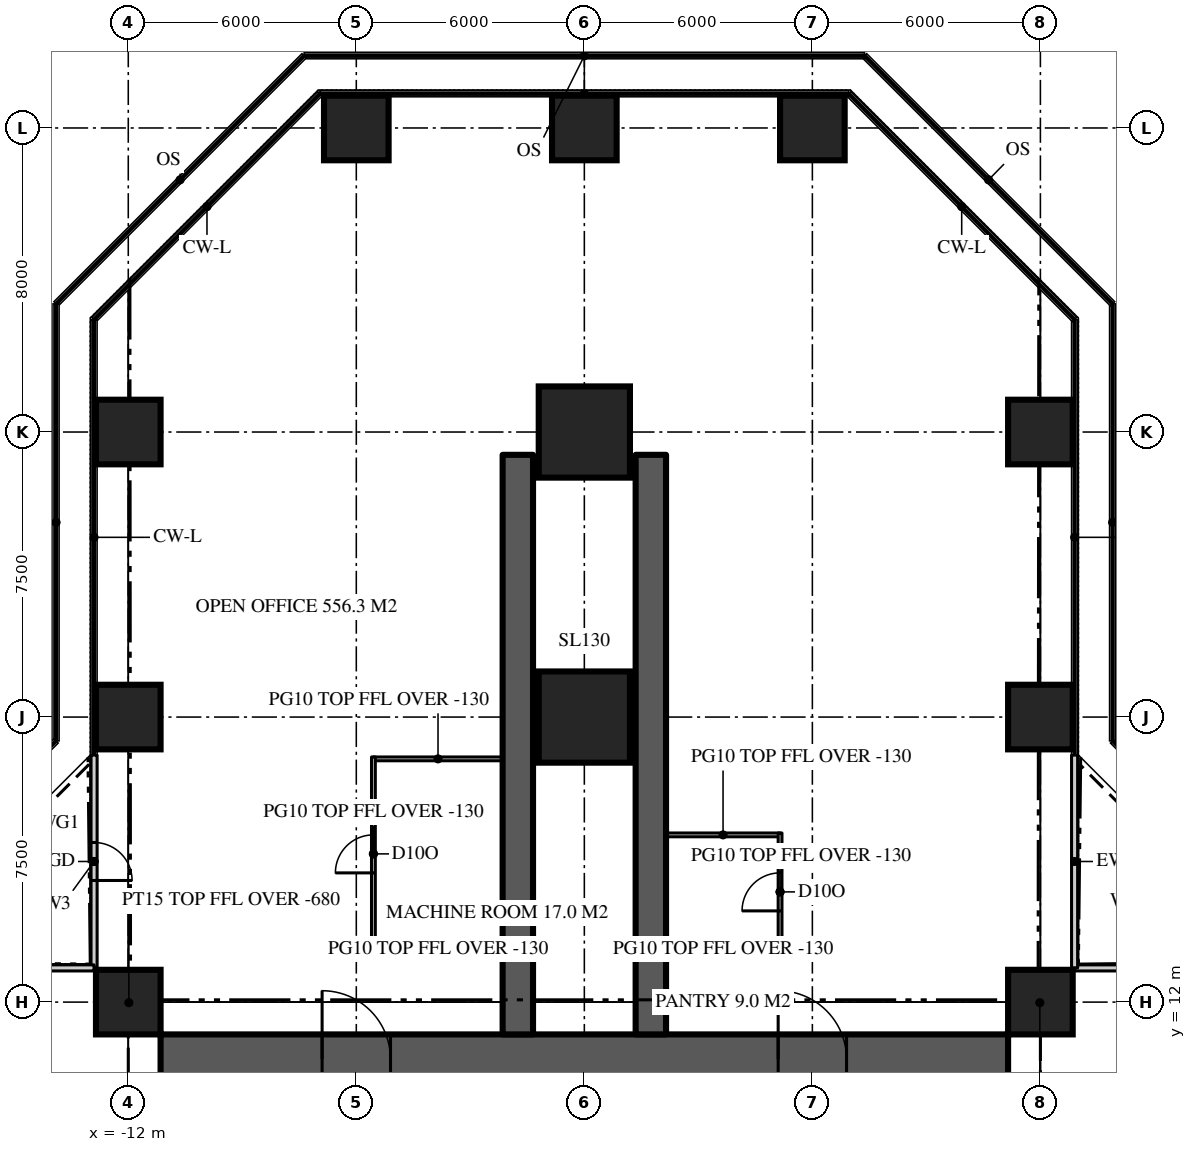
"""IFC4 building model, lengths in metres.
Left out: names, types, materials, properties, quantities, classifications, styles, units other than length and angle.
Written with IfcOpenShell. Run it as: python <this file> out.ifc"""

import sys

from ifc_helpers import new_model, si_unit, direction, frame, frame_2d, origin, origin_2d, place, context, subcontext, project, spatial, rectangle, extrude, element, fill, save


model = new_model("IFC4")
c1 = context("Model", 3, precision=1e-05, world=origin(), true_north=direction((0.0, 1.0)))
c2 = subcontext(c1, "Body", "Model", "MODEL_VIEW")
j1 = project(units=[si_unit("LENGTHUNIT", "METRE"), si_unit("PLANEANGLEUNIT", "RADIAN")], contexts=[c1])
p1 = place(None, origin())
s1 = spatial("IfcSite", under=j1, at=p1, CompositionType="ELEMENT")
p2 = place(p1, origin())
s2 = spatial("IfcBuilding", under=s1, at=p2, CompositionType="ELEMENT")
p3 = place(p2, frame((0.0, 0.0, 63.0)))
s3 = spatial("IfcBuildingStorey", under=s2, at=p3, CompositionType="ELEMENT", Elevation=63.0)
p4 = place(p3, frame((-11.15, 10.5, 0.0), z_axis=(0.0, 0.0, 1.0), x_axis=(1.0, 0.0, 0.0)))
e1 = element("IfcWall", 1, at=p4, inside=s3, PredefinedType="SHEAR", context=c2, shape_type="SweptSolid", body=[
    extrude(rectangle(XDim=22.3, YDim=1.3, at=frame_2d((11.15, 0.0))), origin(), (0.0, 0.0, 1.0), 3.9),
])
p5 = place(p4, frame((4.25, 0.0, 0.0)))
e2 = element("IfcOpeningElement", 2, at=p5, cuts=e1, PredefinedType="OPENING", context=c2, shape_type="SweptSolid", body=[
    extrude(rectangle(XDim=1.8, YDim=2.2, at=frame_2d((0.9, 1.1))), frame((0.0, 0.66, 0.0), z_axis=(0.0, -1.0, 0.0), x_axis=(1.0, 0.0, 0.0)), (0.0, 0.0, 1.0), 1.32),
])
p6 = place(p4, frame((16.25, 0.0, 0.0)))
e3 = element("IfcOpeningElement", 3, at=p6, cuts=e1, PredefinedType="OPENING", context=c2, shape_type="SweptSolid", body=[
    extrude(rectangle(XDim=1.8, YDim=2.2, at=frame_2d((0.9, 1.1))), frame((0.0, 0.66, 0.0), z_axis=(0.0, -1.0, 0.0), x_axis=(1.0, 0.0, 0.0)), (0.0, 0.0, 1.0), 1.32),
])
for number, where, z_axis, x_axis in (
    (4, (1.75, 11.15, 0.0), (0.0, 0.0, 1.0), (0.0, 1.0, 0.0)),
    (5, (-1.75, 11.15, 0.0), (0.0, 0.0, 1.0), (0.0, 1.0, 0.0)),
):
    element("IfcWall", number, at=place(p3, frame(where, z_axis=z_axis, x_axis=x_axis)), inside=s3, PredefinedType="SHEAR", context=c2, shape_type="SweptSolid", body=[
        extrude(rectangle(XDim=15.25, YDim=0.8, at=frame_2d((7.625, 0.0))), origin(), (0.0, 0.0, 1.0), 3.9),
    ])
for number, where, z_axis, x_axis in (
    (6, (-12.0, 12.0, 0.0), (0.0, 0.0, 1.0), (1.0, 0.0, 0.0)),
    (7, (12.0, 12.0, 0.0), (0.0, 0.0, 1.0), (1.0, 0.0, 0.0)),
    (8, (-12.0, 19.5, 0.0), (0.0, 0.0, 1.0), (1.0, 0.0, 0.0)),
):
    element("IfcColumn", number, at=place(p3, frame(where, z_axis=z_axis, x_axis=x_axis)), inside=s3, PredefinedType="COLUMN", context=c2, shape_type="SweptSolid", body=[
        extrude(rectangle(XDim=1.7, YDim=1.7, at=origin_2d()), origin(), (0.0, 0.0, 1.0), 3.9),
    ])
p7 = place(p3, frame((0.0, 19.5, 0.0), z_axis=(0.0, 0.0, 1.0), x_axis=(1.0, 0.0, 0.0)))
e9 = element("IfcColumn", 9, at=p7, inside=s3, PredefinedType="COLUMN", context=c2, shape_type="SweptSolid", body=[
    extrude(rectangle(XDim=2.4, YDim=2.4, at=origin_2d()), origin(), (0.0, 0.0, 1.0), 3.9),
])
for number, where, z_axis, x_axis in (
    (10, (12.0, 19.5, 0.0), (0.0, 0.0, 1.0), (1.0, 0.0, 0.0)),
    (11, (-12.0, 27.0, 0.0), (0.0, 0.0, 1.0), (1.0, 0.0, 0.0)),
):
    element("IfcColumn", number, at=place(p3, frame(where, z_axis=z_axis, x_axis=x_axis)), inside=s3, PredefinedType="COLUMN", context=c2, shape_type="SweptSolid", body=[
        extrude(rectangle(XDim=1.7, YDim=1.7, at=origin_2d()), origin(), (0.0, 0.0, 1.0), 3.9),
    ])
p8 = place(p3, frame((0.0, 27.0, 0.0), z_axis=(0.0, 0.0, 1.0), x_axis=(1.0, 0.0, 0.0)))
e12 = element("IfcColumn", 12, at=p8, inside=s3, PredefinedType="COLUMN", context=c2, shape_type="SweptSolid", body=[
    extrude(rectangle(XDim=2.4, YDim=2.4, at=origin_2d()), origin(), (0.0, 0.0, 1.0), 3.9),
])
for number, where, z_axis, x_axis in (
    (13, (12.0, 27.0, 0.0), (0.0, 0.0, 1.0), (1.0, 0.0, 0.0)),
    (14, (-6.0, 35.0, 0.0), (0.0, 0.0, 1.0), (1.0, 0.0, 0.0)),
    (15, (0.0, 35.0, 0.0), (0.0, 0.0, 1.0), (1.0, 0.0, 0.0)),
    (16, (6.0, 35.0, 0.0), (0.0, 0.0, 1.0), (1.0, 0.0, 0.0)),
):
    element("IfcColumn", number, at=place(p3, frame(where, z_axis=z_axis, x_axis=x_axis)), inside=s3, PredefinedType="COLUMN", context=c2, shape_type="SweptSolid", body=[
        extrude(rectangle(XDim=1.7, YDim=1.7, at=origin_2d()), origin(), (0.0, 0.0, 1.0), 3.9),
    ])
p9 = place(p3, frame((18.5, 12.9, 0.0), z_axis=(0.0, 0.0, 1.0), x_axis=(-1.0, 0.0, 0.0)))
e17 = element("IfcWall", 17, at=p9, inside=s3, PredefinedType="SOLIDWALL", context=c2, shape_type="SweptSolid", body=[
    extrude(rectangle(XDim=5.6, YDim=0.16, at=frame_2d((2.8, 0.0))), origin(), (0.0, 0.0, 1.0), 3.77),
])
p10 = place(p9, frame((2.3, 0.0, 0.0)))
e18 = element("IfcOpeningElement", 18, at=p10, cuts=e17, PredefinedType="OPENING", context=c2, shape_type="SweptSolid", body=[
    extrude(rectangle(XDim=1.0, YDim=2.2, at=frame_2d((0.5, 1.1))), frame((0.0, 0.09, 0.0), z_axis=(0.0, -1.0, 0.0), x_axis=(1.0, 0.0, 0.0)), (0.0, 0.0, 1.0), 0.18),
])
p11 = place(p3, frame((12.9, 12.9, 0.0), z_axis=(0.0, 0.0, 1.0), x_axis=(0.0, 1.0, 0.0)))
e19 = element("IfcWall", 19, at=p11, inside=s3, PredefinedType="SOLIDWALL", context=c2, shape_type="SweptSolid", body=[
    extrude(rectangle(XDim=5.6, YDim=0.16, at=frame_2d((2.8, 0.0))), origin(), (0.0, 0.0, 1.0), 3.77),
])
p12 = place(p3, frame((-12.9, 18.5, 0.0), z_axis=(0.0, 0.0, 1.0), x_axis=(0.0, -1.0, 0.0)))
e20 = element("IfcWall", 20, at=p12, inside=s3, PredefinedType="SOLIDWALL", context=c2, shape_type="SweptSolid", body=[
    extrude(rectangle(XDim=5.6, YDim=0.16, at=frame_2d((2.8, 0.0))), origin(), (0.0, 0.0, 1.0), 3.77),
])
p13 = place(p12, frame((2.3, 0.0, 0.0)))
e21 = element("IfcOpeningElement", 21, at=p13, cuts=e20, PredefinedType="OPENING", context=c2, shape_type="SweptSolid", body=[
    extrude(rectangle(XDim=1.0, YDim=2.2, at=frame_2d((0.5, 1.1))), frame((0.0, 0.09, 0.0), z_axis=(0.0, -1.0, 0.0), x_axis=(1.0, 0.0, 0.0)), (0.0, 0.0, 1.0), 0.18),
])
p14 = place(p3, frame((-12.9, 12.9, 0.0), z_axis=(0.0, 0.0, 1.0), x_axis=(-1.0, 0.0, 0.0)))
e22 = element("IfcWall", 22, at=p14, inside=s3, PredefinedType="SOLIDWALL", context=c2, shape_type="SweptSolid", body=[
    extrude(rectangle(XDim=5.6, YDim=0.16, at=frame_2d((2.8, 0.0))), origin(), (0.0, 0.0, 1.0), 3.77),
])
for number, where, z_axis, x_axis in (
    (23, (-2.15, 13.4, 0.0), (0.0, 0.0, 1.0), (-1.0, 0.0, 0.0)),
    (24, (-2.15, 18.4, 0.0), (0.0, 0.0, 1.0), (-1.0, 0.0, 0.0)),
):
    element("IfcWall", number, at=place(p3, frame(where, z_axis=z_axis, x_axis=x_axis)), inside=s3, PredefinedType="PARTITIONING", context=c2, shape_type="SweptSolid", body=[
        extrude(rectangle(XDim=3.4, YDim=0.1, at=frame_2d((1.7, 0.0))), origin(), (0.0, 0.0, 1.0), 3.77),
    ])
p15 = place(p3, frame((-5.55, 13.35, 0.0), z_axis=(0.0, 0.0, 1.0), x_axis=(0.0, 1.0, 0.0)))
e25 = element("IfcWall", 25, at=p15, inside=s3, PredefinedType="PARTITIONING", context=c2, shape_type="SweptSolid", body=[
    extrude(rectangle(XDim=5.1, YDim=0.1, at=frame_2d((2.55, 0.0))), origin(), (0.0, 0.0, 1.0), 3.77),
])
p16 = place(p15, frame((2.05, 0.0, 0.0)))
e26 = element("IfcOpeningElement", 26, at=p16, cuts=e25, PredefinedType="OPENING", context=c2, shape_type="SweptSolid", body=[
    extrude(rectangle(XDim=1.0, YDim=2.2, at=frame_2d((0.5, 1.1))), frame((0.0, 0.06, 0.0), z_axis=(0.0, -1.0, 0.0), x_axis=(1.0, 0.0, 0.0)), (0.0, 0.0, 1.0), 0.12),
])
for number, where, z_axis, x_axis in (
    (27, (2.15, 13.4, 0.0), (0.0, 0.0, 1.0), (1.0, 0.0, 0.0)),
    (28, (2.15, 16.4, 0.0), (0.0, 0.0, 1.0), (1.0, 0.0, 0.0)),
):
    element("IfcWall", number, at=place(p3, frame(where, z_axis=z_axis, x_axis=x_axis)), inside=s3, PredefinedType="PARTITIONING", context=c2, shape_type="SweptSolid", body=[
        extrude(rectangle(XDim=3.0, YDim=0.1, at=frame_2d((1.5, 0.0))), origin(), (0.0, 0.0, 1.0), 3.77),
    ])
p17 = place(p3, frame((5.15, 13.35, 0.0), z_axis=(0.0, 0.0, 1.0), x_axis=(0.0, 1.0, 0.0)))
e29 = element("IfcWall", 29, at=p17, inside=s3, PredefinedType="PARTITIONING", context=c2, shape_type="SweptSolid", body=[
    extrude(rectangle(XDim=3.1, YDim=0.1, at=frame_2d((1.55, 0.0))), origin(), (0.0, 0.0, 1.0), 3.77),
])
p18 = place(p17, frame((1.05, 0.0, 0.0)))
e30 = element("IfcOpeningElement", 30, at=p18, cuts=e29, PredefinedType="OPENING", context=c2, shape_type="SweptSolid", body=[
    extrude(rectangle(XDim=1.0, YDim=2.2, at=frame_2d((0.5, 1.1))), frame((0.0, 0.06, 0.0), z_axis=(0.0, -1.0, 0.0), x_axis=(1.0, 0.0, 0.0)), (0.0, 0.0, 1.0), 0.12),
])
for number, where, z_axis, x_axis in (
    (31, (11.15, 11.15, 0.0), (0.0, 0.0, 1.0), (0.707, 0.707, 0.0)),
    (32, (-11.15, 11.15, 0.0), (0.0, 0.0, 1.0), (-0.707, 0.707, 0.0)),
):
    element("IfcWall", number, at=place(p3, frame(where, z_axis=z_axis, x_axis=x_axis)), inside=s3, PredefinedType="PARTITIONING", context=c2, shape_type="SweptSolid", body=[
        extrude(rectangle(XDim=2.362, YDim=0.15, at=frame_2d((1.181, 0.0))), origin(), (0.0, 0.0, 1.0), 3.22),
    ])
p19 = place(p13, origin())
e33 = element("IfcDoor", 33, at=p19, inside=s3, OperationType="SINGLE_SWING_RIGHT", PredefinedType="DOOR", context=c2, shape_type="SweptSolid", body=[
    extrude(rectangle(XDim=1.0, YDim=2.2, at=frame_2d((0.5, 1.1))), frame((0.0, 0.025, 0.0), z_axis=(0.0, -1.0, 0.0), x_axis=(1.0, 0.0, 0.0)), (0.0, 0.0, 1.0), 0.05),
])
fill(e21, e33)
p20 = place(p5, origin())
e34 = element("IfcDoor", 34, at=p20, inside=s3, OperationType="DOUBLE_DOOR_DOUBLE_SWING", PredefinedType="DOOR", context=c2, shape_type="SweptSolid", body=[
    extrude(rectangle(XDim=1.8, YDim=2.2, at=frame_2d((0.9, 1.1))), frame((0.0, 0.025, 0.0), z_axis=(0.0, -1.0, 0.0), x_axis=(1.0, 0.0, 0.0)), (0.0, 0.0, 1.0), 0.05),
])
fill(e2, e34)
p21 = place(p6, origin())
e35 = element("IfcDoor", 35, at=p21, inside=s3, OperationType="DOUBLE_DOOR_DOUBLE_SWING", PredefinedType="DOOR", context=c2, shape_type="SweptSolid", body=[
    extrude(rectangle(XDim=1.8, YDim=2.2, at=frame_2d((0.9, 1.1))), frame((0.0, 0.025, 0.0), z_axis=(0.0, -1.0, 0.0), x_axis=(1.0, 0.0, 0.0)), (0.0, 0.0, 1.0), 0.05),
])
fill(e3, e35)
p22 = place(p16, origin())
e36 = element("IfcDoor", 36, at=p22, inside=s3, OperationType="SINGLE_SWING_LEFT", PredefinedType="DOOR", context=c2, shape_type="SweptSolid", body=[
    extrude(rectangle(XDim=1.0, YDim=2.2, at=frame_2d((0.5, 1.1))), frame((0.0, 0.025, 0.0), z_axis=(0.0, -1.0, 0.0), x_axis=(1.0, 0.0, 0.0)), (0.0, 0.0, 1.0), 0.05),
])
fill(e26, e36)
p23 = place(p18, origin())
e37 = element("IfcDoor", 37, at=p23, inside=s3, OperationType="SINGLE_SWING_LEFT", PredefinedType="DOOR", context=c2, shape_type="SweptSolid", body=[
    extrude(rectangle(XDim=1.0, YDim=2.2, at=frame_2d((0.5, 1.1))), frame((0.0, 0.025, 0.0), z_axis=(0.0, -1.0, 0.0), x_axis=(1.0, 0.0, 0.0)), (0.0, 0.0, 1.0), 0.05),
])
fill(e30, e37)
save(model, sys.argv[1])
